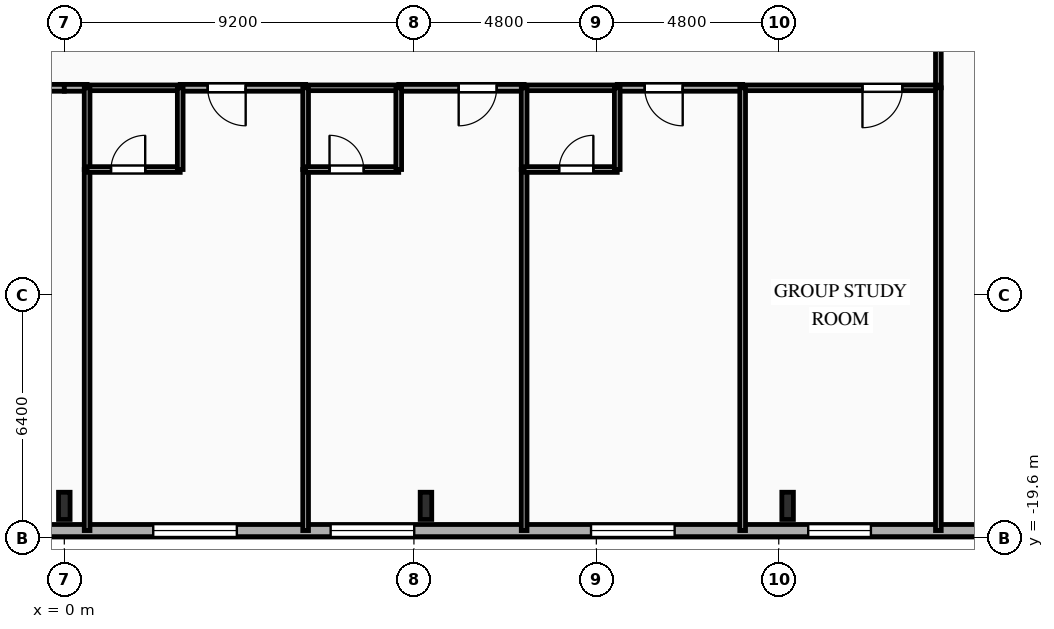
"""IFC4 building model, lengths in metres.
Left out: names, types, materials, properties, quantities, classifications, styles, units other than length and angle.
Written with IfcOpenShell. Run it as: python <this file> out.ifc"""

import sys

from ifc_helpers import new_model, si_unit, direction, frame, frame_2d, origin, origin_2d, place, context, subcontext, project, spatial, rectangle, i_section, extrude, element, fill, save


model = new_model("IFC4")
c1 = context("Model", 3, precision=1e-05, world=origin(), true_north=direction((0.0, 1.0)))
c2 = subcontext(c1, "Body", "Model", "MODEL_VIEW")
j1 = project(units=[si_unit("LENGTHUNIT", "METRE"), si_unit("PLANEANGLEUNIT", "RADIAN")], contexts=[c1])
p1 = place(None, origin())
s1 = spatial("IfcSite", under=j1, at=p1, CompositionType="ELEMENT")
p2 = place(p1, origin())
s2 = spatial("IfcBuilding", under=s1, at=p2, CompositionType="ELEMENT")
p3 = place(p2, frame((0.0, 0.0, 70.55)))
s3 = spatial("IfcBuildingStorey", under=s2, at=p3, CompositionType="ELEMENT", Elevation=70.55)
for number, where, z_axis, x_axis in (
    (1, (0.0, -18.75, 0.0), (0.0, 0.0, 1.0), (1.0, 0.0, 0.0)),
    (2, (9.517, -18.75, 0.0), (0.0, 0.0, 1.0), (1.0, 0.0, 0.0)),
    (3, (19.033, -18.75, 0.0), (0.0, 0.0, 1.0), (1.0, 0.0, 0.0)),
):
    element("IfcColumn", number, at=place(p3, frame(where, z_axis=z_axis, x_axis=x_axis)), inside=s3, PredefinedType="COLUMN", context=c2, shape_type="SweptSolid", body=[
        extrude(i_section(OverallWidth=0.304, OverallDepth=0.716, WebThickness=0.021, FlangeThickness=0.04, FilletRadius=0.027, at=origin_2d()), origin(), (0.0, 0.0, 1.0), 3.35),
    ])
p4 = place(p3, frame((29.2, -19.4, 0.0), z_axis=(0.0, 0.0, 1.0), x_axis=(-1.0, 0.0, 0.0)))
e4 = element("IfcWall", 4, at=p4, inside=s3, PredefinedType="SOLIDWALL", context=c2, shape_type="SweptSolid", body=[
    extrude(rectangle(XDim=58.4, YDim=0.32, at=frame_2d((29.2, 0.0))), origin(), (0.0, 0.0, 1.0), 3.0),
])
p5 = place(p4, frame((2.535, 0.0, 0.85)))
e5 = element("IfcOpeningElement", 5, at=p5, cuts=e4, PredefinedType="OPENING", context=c2, shape_type="SweptSolid", body=[
    extrude(rectangle(XDim=1.65, YDim=1.85, at=frame_2d((0.825, 0.925))), frame((0.0, 0.17, 0.0), z_axis=(0.0, -1.0, 0.0), x_axis=(1.0, 0.0, 0.0)), (0.0, 0.0, 1.0), 0.34),
])
p6 = place(p4, frame((7.975, 0.0, 0.85)))
e6 = element("IfcOpeningElement", 6, at=p6, cuts=e4, PredefinedType="OPENING", context=c2, shape_type="SweptSolid", body=[
    extrude(rectangle(XDim=1.65, YDim=1.85, at=frame_2d((0.825, 0.925))), frame((0.0, 0.17, 0.0), z_axis=(0.0, -1.0, 0.0), x_axis=(1.0, 0.0, 0.0)), (0.0, 0.0, 1.0), 0.34),
])
p7 = place(p4, frame((13.14, 0.0, 0.85)))
e7 = element("IfcOpeningElement", 7, at=p7, cuts=e4, PredefinedType="OPENING", context=c2, shape_type="SweptSolid", body=[
    extrude(rectangle(XDim=2.2, YDim=1.85, at=frame_2d((1.1, 0.925))), frame((0.0, 0.17, 0.0), z_axis=(0.0, -1.0, 0.0), x_axis=(1.0, 0.0, 0.0)), (0.0, 0.0, 1.0), 0.34),
])
p8 = place(p4, frame((19.992, 0.0, 0.85)))
e8 = element("IfcOpeningElement", 8, at=p8, cuts=e4, PredefinedType="OPENING", context=c2, shape_type="SweptSolid", body=[
    extrude(rectangle(XDim=2.2, YDim=1.85, at=frame_2d((1.1, 0.925))), frame((0.0, 0.17, 0.0), z_axis=(0.0, -1.0, 0.0), x_axis=(1.0, 0.0, 0.0)), (0.0, 0.0, 1.0), 0.34),
])
p9 = place(p4, frame((24.66, 0.0, 0.85)))
e9 = element("IfcOpeningElement", 9, at=p9, cuts=e4, PredefinedType="OPENING", context=c2, shape_type="SweptSolid", body=[
    extrude(rectangle(XDim=2.2, YDim=1.85, at=frame_2d((1.1, 0.925))), frame((0.0, 0.17, 0.0), z_axis=(0.0, -1.0, 0.0), x_axis=(1.0, 0.0, 0.0)), (0.0, 0.0, 1.0), 0.34),
])
p10 = place(p4, frame((30.42, 0.0, 0.85)))
e10 = element("IfcOpeningElement", 10, at=p10, cuts=e4, PredefinedType="OPENING", context=c2, shape_type="SweptSolid", body=[
    extrude(rectangle(XDim=2.2, YDim=1.85, at=frame_2d((1.1, 0.925))), frame((0.0, 0.17, 0.0), z_axis=(0.0, -1.0, 0.0), x_axis=(1.0, 0.0, 0.0)), (0.0, 0.0, 1.0), 0.34),
])
p11 = place(p4, frame((36.18, 0.0, 0.85)))
e11 = element("IfcOpeningElement", 11, at=p11, cuts=e4, PredefinedType="OPENING", context=c2, shape_type="SweptSolid", body=[
    extrude(rectangle(XDim=2.2, YDim=1.85, at=frame_2d((1.1, 0.925))), frame((0.0, 0.17, 0.0), z_axis=(0.0, -1.0, 0.0), x_axis=(1.0, 0.0, 0.0)), (0.0, 0.0, 1.0), 0.34),
])
p12 = place(p4, frame((41.94, 0.0, 0.85)))
e12 = element("IfcOpeningElement", 12, at=p12, cuts=e4, PredefinedType="OPENING", context=c2, shape_type="SweptSolid", body=[
    extrude(rectangle(XDim=2.2, YDim=1.85, at=frame_2d((1.1, 0.925))), frame((0.0, 0.17, 0.0), z_axis=(0.0, -1.0, 0.0), x_axis=(1.0, 0.0, 0.0)), (0.0, 0.0, 1.0), 0.34),
])
p13 = place(p4, frame((48.821, 0.0, 0.85)))
e13 = element("IfcOpeningElement", 13, at=p13, cuts=e4, PredefinedType="OPENING", context=c2, shape_type="SweptSolid", body=[
    extrude(rectangle(XDim=1.65, YDim=1.85, at=frame_2d((0.825, 0.925))), frame((0.0, 0.17, 0.0), z_axis=(0.0, -1.0, 0.0), x_axis=(1.0, 0.0, 0.0)), (0.0, 0.0, 1.0), 0.34),
])
p14 = place(p4, frame((53.775, 0.0, 0.85)))
e14 = element("IfcOpeningElement", 14, at=p14, cuts=e4, PredefinedType="OPENING", context=c2, shape_type="SweptSolid", body=[
    extrude(rectangle(XDim=1.65, YDim=1.85, at=frame_2d((0.825, 0.925))), frame((0.0, 0.17, 0.0), z_axis=(0.0, -1.0, 0.0), x_axis=(1.0, 0.0, 0.0)), (0.0, 0.0, 1.0), 0.34),
])
p15 = place(p3, frame((0.0, -7.75, 0.0), z_axis=(0.0, 0.0, 1.0), x_axis=(-1.0, 0.0, 0.0)))
e15 = element("IfcWall", 15, at=p15, inside=s3, PredefinedType="PARTITIONING", context=c2, shape_type="SweptSolid", body=[
    extrude(rectangle(XDim=2.7, YDim=0.18, at=frame_2d((1.35, 0.0))), origin(), (0.0, 0.0, 1.0), 3.0),
])
p16 = place(p15, frame((0.647, 0.0, 0.0)))
e16 = element("IfcOpeningElement", 16, at=p16, cuts=e15, PredefinedType="OPENING", context=c2, shape_type="SweptSolid", body=[
    extrude(rectangle(XDim=1.0, YDim=2.15, at=frame_2d((0.5, 1.075))), frame((0.0, 0.1, 0.0), z_axis=(0.0, -1.0, 0.0), x_axis=(1.0, 0.0, 0.0)), (0.0, 0.0, 1.0), 0.2),
])
p17 = place(p3, frame((23.0, -5.6, 0.0), z_axis=(0.0, 0.0, 1.0), x_axis=(0.0, -1.0, 0.0)))
e17 = element("IfcWall", 17, at=p17, inside=s3, PredefinedType="PARTITIONING", context=c2, shape_type="SweptSolid", body=[
    extrude(rectangle(XDim=2.15, YDim=0.15, at=frame_2d((1.075, 0.0))), origin(), (0.0, 0.0, 1.0), 3.0),
])
p18 = place(p3, frame((0.6, -7.75, 0.0), z_axis=(0.0, 0.0, 1.0), x_axis=(-1.0, 0.0, 0.0)))
e18 = element("IfcWall", 18, at=p18, inside=s3, PredefinedType="PARTITIONING", context=c2, shape_type="SweptSolid", body=[
    extrude(rectangle(XDim=0.6, YDim=0.18, at=frame_2d((0.3, 0.0))), origin(), (0.0, 0.0, 1.0), 3.0),
])
p19 = place(p3, frame((6.35, -7.75, 0.0), z_axis=(0.0, 0.0, 1.0), x_axis=(-1.0, 0.0, 0.0)))
e19 = element("IfcWall", 19, at=p19, inside=s3, PredefinedType="PARTITIONING", context=c2, shape_type="SweptSolid", body=[
    extrude(rectangle(XDim=3.3, YDim=0.18, at=frame_2d((1.65, 0.0))), origin(), (0.0, 0.0, 1.0), 3.0),
])
p20 = place(p19, frame((1.577, 0.0, 0.0)))
e20 = element("IfcOpeningElement", 20, at=p20, cuts=e19, PredefinedType="OPENING", context=c2, shape_type="SweptSolid", body=[
    extrude(rectangle(XDim=1.0, YDim=2.15, at=frame_2d((0.5, 1.075))), frame((0.0, 0.1, 0.0), z_axis=(0.0, -1.0, 0.0), x_axis=(1.0, 0.0, 0.0)), (0.0, 0.0, 1.0), 0.2),
])
p21 = place(p3, frame((3.05, -7.75, 0.0), z_axis=(0.0, 0.0, 1.0), x_axis=(-1.0, 0.0, 0.0)))
e21 = element("IfcWall", 21, at=p21, inside=s3, PredefinedType="PLUMBINGWALL", context=c2, shape_type="SweptSolid", body=[
    extrude(rectangle(XDim=2.45, YDim=0.15, at=frame_2d((1.225, 0.0))), origin(), (0.0, 0.0, 1.0), 3.0),
])
p22 = place(p3, frame((12.1, -7.75, 0.0), z_axis=(0.0, 0.0, 1.0), x_axis=(-1.0, 0.0, 0.0)))
e22 = element("IfcWall", 22, at=p22, inside=s3, PredefinedType="PARTITIONING", context=c2, shape_type="SweptSolid", body=[
    extrude(rectangle(XDim=3.3, YDim=0.18, at=frame_2d((1.65, 0.0))), origin(), (0.0, 0.0, 1.0), 3.0),
])
p23 = place(p22, frame((0.722, 0.0, 0.0)))
e23 = element("IfcOpeningElement", 23, at=p23, cuts=e22, PredefinedType="OPENING", context=c2, shape_type="SweptSolid", body=[
    extrude(rectangle(XDim=1.0, YDim=2.15, at=frame_2d((0.5, 1.075))), frame((0.0, 0.1, 0.0), z_axis=(0.0, -1.0, 0.0), x_axis=(1.0, 0.0, 0.0)), (0.0, 0.0, 1.0), 0.2),
])
p24 = place(p3, frame((8.8, -7.75, 0.0), z_axis=(0.0, 0.0, 1.0), x_axis=(-1.0, 0.0, 0.0)))
e24 = element("IfcWall", 24, at=p24, inside=s3, PredefinedType="PLUMBINGWALL", context=c2, shape_type="SweptSolid", body=[
    extrude(rectangle(XDim=2.45, YDim=0.15, at=frame_2d((1.225, 0.0))), origin(), (0.0, 0.0, 1.0), 3.0),
])
p25 = place(p3, frame((17.85, -7.75, 0.0), z_axis=(0.0, 0.0, 1.0), x_axis=(-1.0, 0.0, 0.0)))
e25 = element("IfcWall", 25, at=p25, inside=s3, PredefinedType="PARTITIONING", context=c2, shape_type="SweptSolid", body=[
    extrude(rectangle(XDim=3.3, YDim=0.18, at=frame_2d((1.65, 0.0))), origin(), (0.0, 0.0, 1.0), 3.0),
])
p26 = place(p25, frame((1.577, 0.0, 0.0)))
e26 = element("IfcOpeningElement", 26, at=p26, cuts=e25, PredefinedType="OPENING", context=c2, shape_type="SweptSolid", body=[
    extrude(rectangle(XDim=1.0, YDim=2.15, at=frame_2d((0.5, 1.075))), frame((0.0, 0.1, 0.0), z_axis=(0.0, -1.0, 0.0), x_axis=(1.0, 0.0, 0.0)), (0.0, 0.0, 1.0), 0.2),
])
p27 = place(p3, frame((14.55, -7.75, 0.0), z_axis=(0.0, 0.0, 1.0), x_axis=(-1.0, 0.0, 0.0)))
e27 = element("IfcWall", 27, at=p27, inside=s3, PredefinedType="PLUMBINGWALL", context=c2, shape_type="SweptSolid", body=[
    extrude(rectangle(XDim=2.45, YDim=0.15, at=frame_2d((1.225, 0.0))), origin(), (0.0, 0.0, 1.0), 3.0),
])
p28 = place(p3, frame((23.0, -7.75, 0.0), z_axis=(0.0, 0.0, 1.0), x_axis=(-1.0, 0.0, 0.0)))
e28 = element("IfcWall", 28, at=p28, inside=s3, PredefinedType="PARTITIONING", context=c2, shape_type="SweptSolid", body=[
    extrude(rectangle(XDim=5.15, YDim=0.15, at=frame_2d((2.575, 0.0))), origin(), (0.0, 0.0, 1.0), 3.0),
])
p29 = place(p28, frame((0.948, 0.0, 0.0)))
e29 = element("IfcOpeningElement", 29, at=p29, cuts=e28, PredefinedType="OPENING", context=c2, shape_type="SweptSolid", body=[
    extrude(rectangle(XDim=1.05, YDim=2.15, at=frame_2d((0.525, 1.075))), frame((0.0, 0.085, 0.0), z_axis=(0.0, -1.0, 0.0), x_axis=(1.0, 0.0, 0.0)), (0.0, 0.0, 1.0), 0.17),
])
p30 = place(p3, frame((23.0, -19.4, 0.0), z_axis=(0.0, 0.0, 1.0), x_axis=(0.0, 1.0, 0.0)))
e30 = element("IfcWall", 30, at=p30, inside=s3, PredefinedType="PARTITIONING", context=c2, shape_type="SweptSolid", body=[
    extrude(rectangle(XDim=11.65, YDim=0.15, at=frame_2d((5.825, 0.0))), origin(), (0.0, 0.0, 1.0), 3.0),
])
p31 = place(p3, frame((0.6, -9.9, 0.0), z_axis=(0.0, 0.0, 1.0), x_axis=(0.0, -1.0, 0.0)))
e31 = element("IfcWall", 31, at=p31, inside=s3, PredefinedType="PARTITIONING", context=c2, shape_type="SweptSolid", body=[
    extrude(rectangle(XDim=9.5, YDim=0.15, at=frame_2d((4.75, 0.0))), origin(), (0.0, 0.0, 1.0), 3.0),
])
p32 = place(p3, frame((0.6, -7.75, 0.0), z_axis=(0.0, 0.0, 1.0), x_axis=(0.0, -1.0, 0.0)))
e32 = element("IfcWall", 32, at=p32, inside=s3, PredefinedType="PLUMBINGWALL", context=c2, shape_type="SweptSolid", body=[
    extrude(rectangle(XDim=2.15, YDim=0.15, at=frame_2d((1.075, 0.0))), origin(), (0.0, 0.0, 1.0), 3.0),
])
p33 = place(p3, frame((0.6, -9.9, 0.0), z_axis=(0.0, 0.0, 1.0), x_axis=(1.0, 0.0, 0.0)))
e33 = element("IfcWall", 33, at=p33, inside=s3, PredefinedType="PLUMBINGWALL", context=c2, shape_type="SweptSolid", body=[
    extrude(rectangle(XDim=2.45, YDim=0.15, at=frame_2d((1.225, 0.0))), origin(), (0.0, 0.0, 1.0), 3.0),
])
p34 = place(p33, frame((0.629, 0.0, 0.0)))
e34 = element("IfcOpeningElement", 34, at=p34, cuts=e33, PredefinedType="OPENING", context=c2, shape_type="SweptSolid", body=[
    extrude(rectangle(XDim=0.9, YDim=2.1, at=frame_2d((0.45, 1.05))), frame((0.0, 0.085, 0.0), z_axis=(0.0, -1.0, 0.0), x_axis=(1.0, 0.0, 0.0)), (0.0, 0.0, 1.0), 0.17),
])
p35 = place(p3, frame((3.05, -9.9, 0.0), z_axis=(0.0, 0.0, 1.0), x_axis=(0.0, 1.0, 0.0)))
e35 = element("IfcWall", 35, at=p35, inside=s3, PredefinedType="PLUMBINGWALL", context=c2, shape_type="SweptSolid", body=[
    extrude(rectangle(XDim=2.15, YDim=0.15, at=frame_2d((1.075, 0.0))), origin(), (0.0, 0.0, 1.0), 3.0),
])
p36 = place(p3, frame((6.35, -9.9, 0.0), z_axis=(0.0, 0.0, 1.0), x_axis=(0.0, -1.0, 0.0)))
e36 = element("IfcWall", 36, at=p36, inside=s3, PredefinedType="PARTITIONING", context=c2, shape_type="SweptSolid", body=[
    extrude(rectangle(XDim=9.5, YDim=0.15, at=frame_2d((4.75, 0.0))), origin(), (0.0, 0.0, 1.0), 3.0),
])
p37 = place(p3, frame((6.35, -7.75, 0.0), z_axis=(0.0, 0.0, 1.0), x_axis=(0.0, -1.0, 0.0)))
e37 = element("IfcWall", 37, at=p37, inside=s3, PredefinedType="PLUMBINGWALL", context=c2, shape_type="SweptSolid", body=[
    extrude(rectangle(XDim=2.15, YDim=0.15, at=frame_2d((1.075, 0.0))), origin(), (0.0, 0.0, 1.0), 3.0),
])
p38 = place(p3, frame((6.35, -9.9, 0.0), z_axis=(0.0, 0.0, 1.0), x_axis=(1.0, 0.0, 0.0)))
e38 = element("IfcWall", 38, at=p38, inside=s3, PredefinedType="PLUMBINGWALL", context=c2, shape_type="SweptSolid", body=[
    extrude(rectangle(XDim=2.45, YDim=0.15, at=frame_2d((1.225, 0.0))), origin(), (0.0, 0.0, 1.0), 3.0),
])
p39 = place(p38, frame((0.629, 0.0, 0.0)))
e39 = element("IfcOpeningElement", 39, at=p39, cuts=e38, PredefinedType="OPENING", context=c2, shape_type="SweptSolid", body=[
    extrude(rectangle(XDim=0.9, YDim=2.1, at=frame_2d((0.45, 1.05))), frame((0.0, 0.085, 0.0), z_axis=(0.0, -1.0, 0.0), x_axis=(1.0, 0.0, 0.0)), (0.0, 0.0, 1.0), 0.17),
])
p40 = place(p3, frame((8.8, -9.9, 0.0), z_axis=(0.0, 0.0, 1.0), x_axis=(0.0, 1.0, 0.0)))
e40 = element("IfcWall", 40, at=p40, inside=s3, PredefinedType="PLUMBINGWALL", context=c2, shape_type="SweptSolid", body=[
    extrude(rectangle(XDim=2.15, YDim=0.15, at=frame_2d((1.075, 0.0))), origin(), (0.0, 0.0, 1.0), 3.0),
])
p41 = place(p3, frame((12.1, -9.9, 0.0), z_axis=(0.0, 0.0, 1.0), x_axis=(0.0, -1.0, 0.0)))
e41 = element("IfcWall", 41, at=p41, inside=s3, PredefinedType="PARTITIONING", context=c2, shape_type="SweptSolid", body=[
    extrude(rectangle(XDim=9.5, YDim=0.15, at=frame_2d((4.75, 0.0))), origin(), (0.0, 0.0, 1.0), 3.0),
])
p42 = place(p3, frame((12.1, -7.75, 0.0), z_axis=(0.0, 0.0, 1.0), x_axis=(0.0, -1.0, 0.0)))
e42 = element("IfcWall", 42, at=p42, inside=s3, PredefinedType="PLUMBINGWALL", context=c2, shape_type="SweptSolid", body=[
    extrude(rectangle(XDim=2.15, YDim=0.15, at=frame_2d((1.075, 0.0))), origin(), (0.0, 0.0, 1.0), 3.0),
])
p43 = place(p3, frame((12.1, -9.9, 0.0), z_axis=(0.0, 0.0, 1.0), x_axis=(1.0, 0.0, 0.0)))
e43 = element("IfcWall", 43, at=p43, inside=s3, PredefinedType="PLUMBINGWALL", context=c2, shape_type="SweptSolid", body=[
    extrude(rectangle(XDim=2.45, YDim=0.15, at=frame_2d((1.225, 0.0))), origin(), (0.0, 0.0, 1.0), 3.0),
])
p44 = place(p43, frame((0.921, 0.0, 0.0)))
e44 = element("IfcOpeningElement", 44, at=p44, cuts=e43, PredefinedType="OPENING", context=c2, shape_type="SweptSolid", body=[
    extrude(rectangle(XDim=0.9, YDim=2.1, at=frame_2d((0.45, 1.05))), frame((0.0, 0.085, 0.0), z_axis=(0.0, -1.0, 0.0), x_axis=(1.0, 0.0, 0.0)), (0.0, 0.0, 1.0), 0.17),
])
p45 = place(p3, frame((14.55, -9.9, 0.0), z_axis=(0.0, 0.0, 1.0), x_axis=(0.0, 1.0, 0.0)))
e45 = element("IfcWall", 45, at=p45, inside=s3, PredefinedType="PLUMBINGWALL", context=c2, shape_type="SweptSolid", body=[
    extrude(rectangle(XDim=2.15, YDim=0.15, at=frame_2d((1.075, 0.0))), origin(), (0.0, 0.0, 1.0), 3.0),
])
p46 = place(p3, frame((17.85, -7.75, 0.0), z_axis=(0.0, 0.0, 1.0), x_axis=(0.0, -1.0, 0.0)))
e46 = element("IfcWall", 46, at=p46, inside=s3, PredefinedType="PARTITIONING", context=c2, shape_type="SweptSolid", body=[
    extrude(rectangle(XDim=11.65, YDim=0.15, at=frame_2d((5.825, 0.0))), origin(), (0.0, 0.0, 1.0), 3.0),
])
p47 = place(p6, origin())
e47 = element("IfcWindow", 47, at=p47, inside=s3, PartitioningType="SINGLE_PANEL", PredefinedType="WINDOW", context=c2, shape_type="SweptSolid", body=[
    extrude(rectangle(XDim=1.65, YDim=1.85, at=frame_2d((0.825, 0.925))), frame((0.0, 0.03, 0.0), z_axis=(0.0, -1.0, 0.0), x_axis=(1.0, 0.0, 0.0)), (0.0, 0.0, 1.0), 0.06),
])
fill(e6, e47)
p48 = place(p7, origin())
e48 = element("IfcWindow", 48, at=p48, inside=s3, PartitioningType="SINGLE_PANEL", PredefinedType="WINDOW", context=c2, shape_type="SweptSolid", body=[
    extrude(rectangle(XDim=2.2, YDim=1.85, at=frame_2d((1.1, 0.925))), frame((0.0, 0.03, 0.0), z_axis=(0.0, -1.0, 0.0), x_axis=(1.0, 0.0, 0.0)), (0.0, 0.0, 1.0), 0.06),
])
fill(e7, e48)
p49 = place(p8, origin())
e49 = element("IfcWindow", 49, at=p49, inside=s3, PartitioningType="SINGLE_PANEL", PredefinedType="WINDOW", context=c2, shape_type="SweptSolid", body=[
    extrude(rectangle(XDim=2.2, YDim=1.85, at=frame_2d((1.1, 0.925))), frame((0.0, 0.03, 0.0), z_axis=(0.0, -1.0, 0.0), x_axis=(1.0, 0.0, 0.0)), (0.0, 0.0, 1.0), 0.06),
])
fill(e8, e49)
p50 = place(p9, origin())
e50 = element("IfcWindow", 50, at=p50, inside=s3, PartitioningType="SINGLE_PANEL", PredefinedType="WINDOW", context=c2, shape_type="SweptSolid", body=[
    extrude(rectangle(XDim=2.2, YDim=1.85, at=frame_2d((1.1, 0.925))), frame((0.0, 0.03, 0.0), z_axis=(0.0, -1.0, 0.0), x_axis=(1.0, 0.0, 0.0)), (0.0, 0.0, 1.0), 0.06),
])
fill(e9, e50)
p51 = place(p20, origin())
e51 = element("IfcDoor", 51, at=p51, inside=s3, OperationType="SINGLE_SWING_LEFT", PredefinedType="DOOR", context=c2, shape_type="SweptSolid", body=[
    extrude(rectangle(XDim=1.0, YDim=2.15, at=frame_2d((0.5, 1.075))), frame((0.0, 0.025, 0.0), z_axis=(0.0, -1.0, 0.0), x_axis=(1.0, 0.0, 0.0)), (0.0, 0.0, 1.0), 0.05),
])
fill(e20, e51)
p52 = place(p23, origin())
e52 = element("IfcDoor", 52, at=p52, inside=s3, OperationType="SINGLE_SWING_RIGHT", PredefinedType="DOOR", context=c2, shape_type="SweptSolid", body=[
    extrude(rectangle(XDim=1.0, YDim=2.15, at=frame_2d((0.5, 1.075))), frame((0.0, 0.025, 0.0), z_axis=(0.0, -1.0, 0.0), x_axis=(1.0, 0.0, 0.0)), (0.0, 0.0, 1.0), 0.05),
])
fill(e23, e52)
p53 = place(p26, origin())
e53 = element("IfcDoor", 53, at=p53, inside=s3, OperationType="SINGLE_SWING_LEFT", PredefinedType="DOOR", context=c2, shape_type="SweptSolid", body=[
    extrude(rectangle(XDim=1.0, YDim=2.15, at=frame_2d((0.5, 1.075))), frame((0.0, 0.025, 0.0), z_axis=(0.0, -1.0, 0.0), x_axis=(1.0, 0.0, 0.0)), (0.0, 0.0, 1.0), 0.05),
])
fill(e26, e53)
p54 = place(p29, origin())
e54 = element("IfcDoor", 54, at=p54, inside=s3, OperationType="SINGLE_SWING_RIGHT", PredefinedType="DOOR", context=c2, shape_type="SweptSolid", body=[
    extrude(rectangle(XDim=1.05, YDim=2.15, at=frame_2d((0.525, 1.075))), frame((0.0, 0.025, 0.0), z_axis=(0.0, -1.0, 0.0), x_axis=(1.0, 0.0, 0.0)), (0.0, 0.0, 1.0), 0.05),
])
fill(e29, e54)
p55 = place(p34, origin())
e55 = element("IfcDoor", 55, at=p55, inside=s3, OperationType="SINGLE_SWING_RIGHT", PredefinedType="DOOR", context=c2, shape_type="SweptSolid", body=[
    extrude(rectangle(XDim=0.9, YDim=2.1, at=frame_2d((0.45, 1.05))), frame((0.0, 0.025, 0.0), z_axis=(0.0, -1.0, 0.0), x_axis=(1.0, 0.0, 0.0)), (0.0, 0.0, 1.0), 0.05),
])
fill(e34, e55)
p56 = place(p39, origin())
e56 = element("IfcDoor", 56, at=p56, inside=s3, OperationType="SINGLE_SWING_LEFT", PredefinedType="DOOR", context=c2, shape_type="SweptSolid", body=[
    extrude(rectangle(XDim=0.9, YDim=2.1, at=frame_2d((0.45, 1.05))), frame((0.0, 0.025, 0.0), z_axis=(0.0, -1.0, 0.0), x_axis=(1.0, 0.0, 0.0)), (0.0, 0.0, 1.0), 0.05),
])
fill(e39, e56)
p57 = place(p44, origin())
e57 = element("IfcDoor", 57, at=p57, inside=s3, OperationType="SINGLE_SWING_RIGHT", PredefinedType="DOOR", context=c2, shape_type="SweptSolid", body=[
    extrude(rectangle(XDim=0.9, YDim=2.1, at=frame_2d((0.45, 1.05))), frame((0.0, 0.025, 0.0), z_axis=(0.0, -1.0, 0.0), x_axis=(1.0, 0.0, 0.0)), (0.0, 0.0, 1.0), 0.05),
])
fill(e44, e57)
save(model, sys.argv[1])
